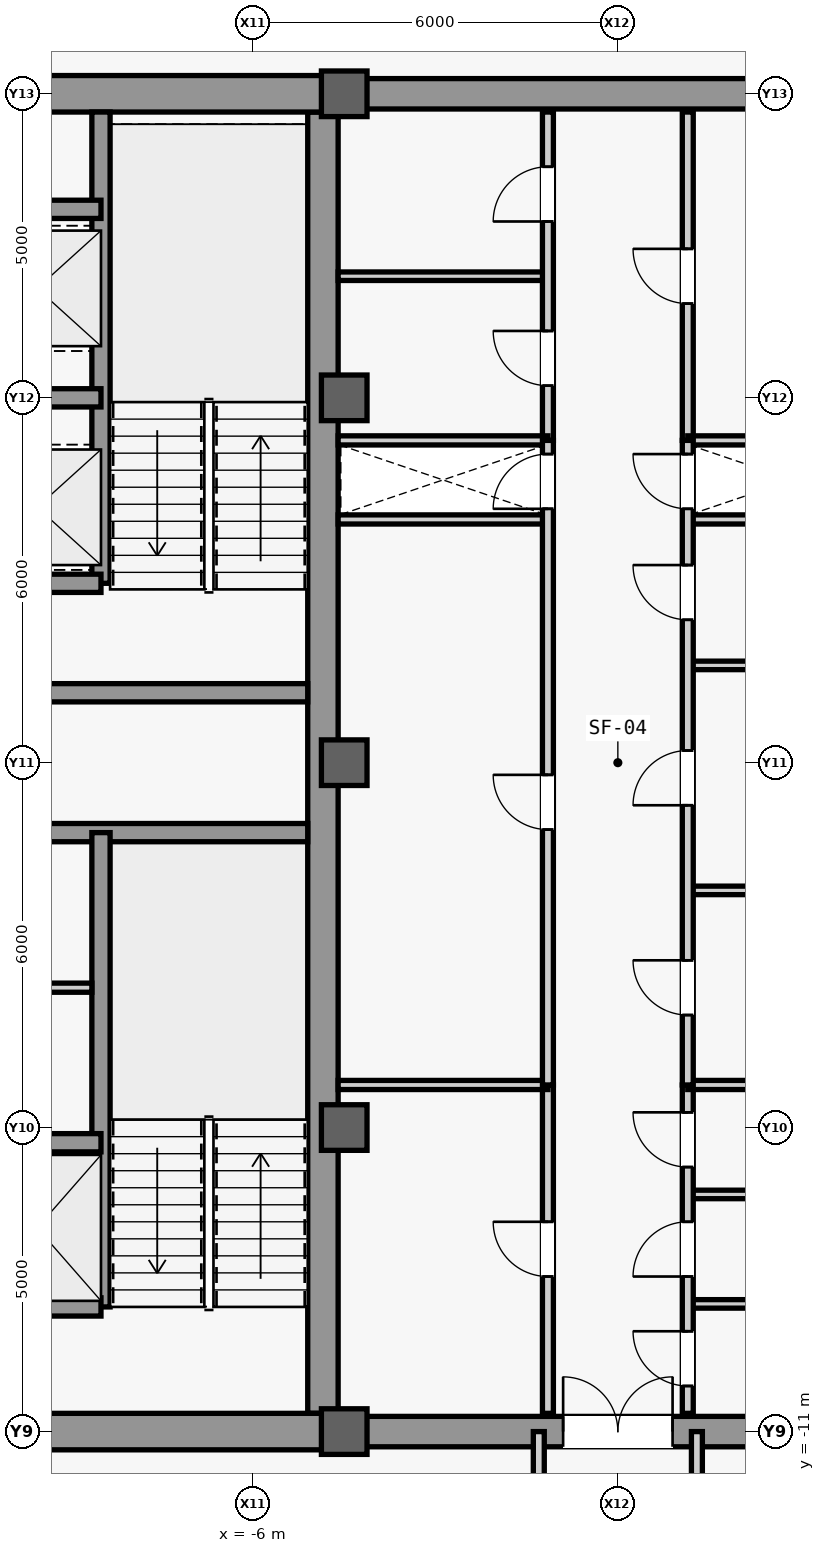
"""IFC4 building model, lengths in metres.
Left out: names, types, materials, properties, quantities, classifications, styles, units other than length and angle.
Written with IfcOpenShell. Run it as: python <this file> out.ifc"""

import sys

from ifc_helpers import new_model, si_unit, direction, frame, frame_2d, origin, origin_2d, place, context, subcontext, project, spatial, rectangle, extrude, source, transform, mapped, element, fill, save


model = new_model("IFC4")
c1 = context("Model", 3, precision=1e-05, world=origin(), true_north=direction((0.0, 1.0)))
c2 = subcontext(c1, "Body", "Model", "MODEL_VIEW")
j1 = project(units=[si_unit("LENGTHUNIT", "METRE"), si_unit("PLANEANGLEUNIT", "RADIAN")], contexts=[c1])
p1 = place(None, origin())
s1 = spatial("IfcSite", under=j1, at=p1, CompositionType="ELEMENT")
p2 = place(p1, origin())
s2 = spatial("IfcBuilding", under=s1, at=p2, CompositionType="ELEMENT")
p3 = place(p2, frame((0.0, 0.0, 313.5)))
s3 = spatial("IfcBuildingStorey", under=s2, at=p3, CompositionType="ELEMENT", Elevation=313.5)
m1 = source(origin(), c2, "Body", "SweptSolid", [
    extrude(rectangle(XDim=21.4, YDim=0.5, at=frame_2d((10.7, 0.0))), origin(), (0.0, 0.0, 1.0), 3.78),
])
p4 = place(p3, frame((-4.85, -10.7, 0.0), z_axis=(0.0, 0.0, 1.0), x_axis=(0.0, 1.0, 0.0)))
e1 = element("IfcWall", 1, at=p4, inside=s3, PredefinedType="SHEAR", context=c2, shape_type="MappedRepresentation", body=[
    mapped(m1, transform((0.0, 0.0, 0.0), scale=1.0)),
])
m2 = source(origin(), c2, "Body", "SweptSolid", [
    extrude(rectangle(XDim=5.9, YDim=0.6, at=frame_2d((2.95, 0.0))), origin(), (0.0, 0.0, 1.0), 3.78),
])
for number, where, z_axis, x_axis in (
    (2, (-10.75, -11.0, 0.0), (0.0, 0.0, 1.0), (1.0, 0.0, 0.0)),
    (3, (-10.75, 11.0, 0.0), (0.0, 0.0, 1.0), (1.0, 0.0, 0.0)),
):
    element("IfcWall", number, at=place(p3, frame(where, z_axis=z_axis, x_axis=x_axis)), inside=s3, PredefinedType="SHEAR", context=c2, shape_type="MappedRepresentation", body=[
        mapped(m2, transform((0.0, 0.0, 0.0), scale=1.0)),
    ])
m3 = source(origin(), c2, "Body", "SweptSolid", [
    extrude(rectangle(XDim=5.65, YDim=0.3, at=frame_2d((2.825, 0.0))), origin(), (0.0, 0.0, 1.0), 3.78),
])
for number, where, z_axis, x_axis in (
    (4, (-10.75, -1.15, 0.0), (0.0, 0.0, 1.0), (1.0, 0.0, 0.0)),
    (5, (-10.75, 1.15, 0.0), (0.0, 0.0, 1.0), (1.0, 0.0, 0.0)),
):
    element("IfcWall", number, at=place(p3, frame(where, z_axis=z_axis, x_axis=x_axis)), inside=s3, PredefinedType="SHEAR", context=c2, shape_type="MappedRepresentation", body=[
        mapped(m3, transform((0.0, 0.0, 0.0), scale=1.0)),
    ])
m4 = source(origin(), c2, "Body", "SweptSolid", [
    extrude(rectangle(XDim=9.2, YDim=0.5, at=frame_2d((4.6, 0.0))), origin(), (0.0, 0.0, 1.0), 3.78),
])
p5 = place(p3, frame((-4.6, -11.0, 0.0), z_axis=(0.0, 0.0, 1.0), x_axis=(1.0, 0.0, 0.0)))
e6 = element("IfcWall", 6, at=p5, inside=s3, PredefinedType="SHEAR", context=c2, shape_type="MappedRepresentation", body=[
    mapped(m4, transform((0.0, 0.0, 0.0), scale=1.0)),
])
m5 = source(origin(), c2, "Body", "SweptSolid", [
    extrude(rectangle(XDim=1.8, YDim=2.25, at=frame_2d((0.9, 1.125))), frame((0.0, 0.26, 0.0), z_axis=(0.0, -1.0, 0.0), x_axis=(1.0, 0.0, 0.0)), (0.0, 0.0, 1.0), 0.52),
])
p6 = place(p5, frame((3.7, 0.0, 0.0)))
e7 = element("IfcOpeningElement", 7, at=p6, cuts=e6, PredefinedType="OPENING", context=c2, shape_type="MappedRepresentation", body=[
    mapped(m5, transform((0.0, 0.0, 0.0), scale=1.0)),
])
p7 = place(p3, frame((-4.6, 11.0, 0.0), z_axis=(0.0, 0.0, 1.0), x_axis=(1.0, 0.0, 0.0)))
e8 = element("IfcWall", 8, at=p7, inside=s3, PredefinedType="SHEAR", context=c2, shape_type="MappedRepresentation", body=[
    mapped(m4, transform((0.0, 0.0, 0.0), scale=1.0)),
])
m6 = source(origin(), c2, "Body", "SweptSolid", [
    extrude(rectangle(XDim=0.75, YDim=0.75, at=origin_2d()), origin(), (0.0, 0.0, 1.0), 4.0),
])
for number, where, z_axis, x_axis in (
    (9, (-4.5, -11.0, 0.0), (0.0, 0.0, 1.0), (1.0, 0.0, 0.0)),
    (10, (-4.5, -6.0, 0.0), (0.0, 0.0, 1.0), (1.0, 0.0, 0.0)),
    (11, (-4.5, 0.0, 0.0), (0.0, 0.0, 1.0), (1.0, 0.0, 0.0)),
    (12, (-4.5, 6.0, 0.0), (0.0, 0.0, 1.0), (1.0, 0.0, 0.0)),
    (13, (-4.5, 11.0, 0.0), (0.0, 0.0, 1.0), (1.0, 0.0, 0.0)),
):
    element("IfcColumn", number, at=place(p3, frame(where, z_axis=z_axis, x_axis=x_axis)), inside=s3, PredefinedType="COLUMN", context=c2, shape_type="MappedRepresentation", body=[
        mapped(m6, transform((0.0, 0.0, 0.0), scale=1.0)),
    ])
m7 = source(origin(), c2, "Body", "SweptSolid", [
    extrude(rectangle(XDim=7.8, YDim=0.3, at=frame_2d((3.9, 0.0))), origin(), (0.0, 0.0, 1.0), 3.78),
])
p8 = place(p3, frame((-8.5, -8.95, 0.0), z_axis=(0.0, 0.0, 1.0), x_axis=(0.0, 1.0, 0.0)))
e14 = element("IfcWall", 14, at=p8, inside=s3, PredefinedType="SHEAR", context=c2, shape_type="MappedRepresentation", body=[
    mapped(m7, transform((0.0, 0.0, 0.0), scale=1.0)),
])
m8 = source(origin(), c2, "Body", "SweptSolid", [
    extrude(rectangle(XDim=2.2, YDim=0.3, at=frame_2d((1.1, 0.0))), origin(), (0.0, 0.0, 1.0), 3.78),
])
for number, where, z_axis, x_axis in (
    (15, (-10.7, -8.95, 0.0), (0.0, 0.0, 1.0), (1.0, 0.0, 0.0)),
    (16, (-10.7, -6.25, 0.0), (0.0, 0.0, 1.0), (1.0, 0.0, 0.0)),
):
    element("IfcWall", number, at=place(p3, frame(where, z_axis=z_axis, x_axis=x_axis)), inside=s3, PredefinedType="SHEAR", context=c2, shape_type="MappedRepresentation", body=[
        mapped(m8, transform((0.0, 0.0, 0.0), scale=1.0)),
    ])
m9 = source(origin(), c2, "Body", "SweptSolid", [
    extrude(rectangle(XDim=7.75, YDim=0.3, at=frame_2d((3.875, 0.0))), origin(), (0.0, 0.0, 1.0), 3.78),
])
p9 = place(p3, frame((-8.5, 2.95, 0.0), z_axis=(0.0, 0.0, 1.0), x_axis=(0.0, 1.0, 0.0)))
e17 = element("IfcWall", 17, at=p9, inside=s3, PredefinedType="SHEAR", context=c2, shape_type="MappedRepresentation", body=[
    mapped(m9, transform((0.0, 0.0, 0.0), scale=1.0)),
])
for number, where, z_axis, x_axis in (
    (18, (-10.7, 2.95, 0.0), (0.0, 0.0, 1.0), (1.0, 0.0, 0.0)),
    (19, (-10.7, 6.0, 0.0), (0.0, 0.0, 1.0), (1.0, 0.0, 0.0)),
    (20, (-10.7, 9.1, 0.0), (0.0, 0.0, 1.0), (1.0, 0.0, 0.0)),
):
    element("IfcWall", number, at=place(p3, frame(where, z_axis=z_axis, x_axis=x_axis)), inside=s3, PredefinedType="SHEAR", context=c2, shape_type="MappedRepresentation", body=[
        mapped(m8, transform((0.0, 0.0, 0.0), scale=1.0)),
    ])
m10 = source(origin(), c2, "Body", "SweptSolid", [
    extrude(rectangle(XDim=2.05, YDim=0.15, at=frame_2d((1.025, 0.0))), origin(), (0.0, 0.0, 1.0), 3.78),
])
p10 = place(p3, frame((-10.7, -3.7, 0.0), z_axis=(0.0, 0.0, 1.0), x_axis=(1.0, 0.0, 0.0)))
e21 = element("IfcWall", 21, at=p10, inside=s3, PredefinedType="PARTITIONING", context=c2, shape_type="MappedRepresentation", body=[
    mapped(m10, transform((0.0, 0.0, 0.0), scale=1.0)),
])
m11 = source(origin(), c2, "Body", "SweptSolid", [
    extrude(rectangle(XDim=3.45, YDim=0.15, at=frame_2d((1.725, 0.0))), origin(), (0.0, 0.0, 1.0), 3.78),
])
for number, where, z_axis, x_axis in (
    (22, (-4.6, 4.0, 0.0), (0.0, 0.0, 1.0), (1.0, 0.0, 0.0)),
    (23, (1.15, 4.0, 0.0), (0.0, 0.0, 1.0), (1.0, 0.0, 0.0)),
):
    element("IfcWall", number, at=place(p3, frame(where, z_axis=z_axis, x_axis=x_axis)), inside=s3, PredefinedType="PARTITIONING", context=c2, shape_type="MappedRepresentation", body=[
        mapped(m11, transform((0.0, 0.0, 0.0), scale=1.0)),
    ])
m12 = source(origin(), c2, "Body", "SweptSolid", [
    extrude(rectangle(XDim=5.4, YDim=0.18, at=frame_2d((2.7, 0.0))), origin(), (0.0, 0.0, 1.0), 3.78),
])
p11 = place(p3, frame((-1.15, -10.7, 0.0), z_axis=(0.0, 0.0, 1.0), x_axis=(0.0, 1.0, 0.0)))
e24 = element("IfcWall", 24, at=p11, inside=s3, PredefinedType="PARTITIONING", context=c2, shape_type="MappedRepresentation", body=[
    mapped(m12, transform((0.0, 0.0, 0.0), scale=1.0)),
])
m13 = source(origin(), c2, "Body", "SweptSolid", [
    extrude(rectangle(XDim=0.9, YDim=2.15, at=frame_2d((0.45, 1.075))), frame((0.0, 0.1, 0.0), z_axis=(0.0, -1.0, 0.0), x_axis=(1.0, 0.0, 0.0)), (0.0, 0.0, 1.0), 0.2),
])
p12 = place(p11, frame((2.25, 0.0, 0.0)))
e25 = element("IfcOpeningElement", 25, at=p12, cuts=e24, PredefinedType="OPENING", context=c2, shape_type="MappedRepresentation", body=[
    mapped(m13, transform((0.0, 0.0, 0.0), scale=1.0)),
])
m14 = source(origin(), c2, "Body", "SweptSolid", [
    extrude(rectangle(XDim=3.45, YDim=0.14, at=frame_2d((1.725, 0.0))), origin(), (0.0, 0.0, 1.0), 3.78),
])
for number, where, z_axis, x_axis in (
    (26, (1.15, -8.9, 0.0), (0.0, 0.0, 1.0), (1.0, 0.0, 0.0)),
    (27, (1.15, -7.1, 0.0), (0.0, 0.0, 1.0), (1.0, 0.0, 0.0)),
):
    element("IfcWall", number, at=place(p3, frame(where, z_axis=z_axis, x_axis=x_axis)), inside=s3, PredefinedType="PARTITIONING", context=c2, shape_type="MappedRepresentation", body=[
        mapped(m14, transform((0.0, 0.0, 0.0), scale=1.0)),
    ])
p13 = place(p3, frame((1.15, -10.7, 0.0), z_axis=(0.0, 0.0, 1.0), x_axis=(0.0, 1.0, 0.0)))
e28 = element("IfcWall", 28, at=p13, inside=s3, PredefinedType="PARTITIONING", context=c2, shape_type="MappedRepresentation", body=[
    mapped(m12, transform((0.0, 0.0, 0.0), scale=1.0)),
])
p14 = place(p13, frame((0.45, 0.0, 0.0)))
e29 = element("IfcOpeningElement", 29, at=p14, cuts=e28, PredefinedType="OPENING", context=c2, shape_type="MappedRepresentation", body=[
    mapped(m13, transform((0.0, 0.0, 0.0), scale=1.0)),
])
p15 = place(p13, frame((2.25, 0.0, 0.0)))
e30 = element("IfcOpeningElement", 30, at=p15, cuts=e28, PredefinedType="OPENING", context=c2, shape_type="MappedRepresentation", body=[
    mapped(m13, transform((0.0, 0.0, 0.0), scale=1.0)),
])
p16 = place(p13, frame((4.05, 0.0, 0.0)))
e31 = element("IfcOpeningElement", 31, at=p16, cuts=e28, PredefinedType="OPENING", context=c2, shape_type="MappedRepresentation", body=[
    mapped(m13, transform((0.0, 0.0, 0.0), scale=1.0)),
])
for number, where, z_axis, x_axis in (
    (32, (-4.6, -5.3, 0.0), (0.0, 0.0, 1.0), (1.0, 0.0, 0.0)),
    (33, (1.15, -5.3, 0.0), (0.0, 0.0, 1.0), (1.0, 0.0, 0.0)),
):
    element("IfcWall", number, at=place(p3, frame(where, z_axis=z_axis, x_axis=x_axis)), inside=s3, PredefinedType="PARTITIONING", context=c2, shape_type="MappedRepresentation", body=[
        mapped(m11, transform((0.0, 0.0, 0.0), scale=1.0)),
    ])
p17 = place(p3, frame((-4.6, 8.0, 0.0), z_axis=(0.0, 0.0, 1.0), x_axis=(1.0, 0.0, 0.0)))
e34 = element("IfcWall", 34, at=p17, inside=s3, PredefinedType="PARTITIONING", context=c2, shape_type="MappedRepresentation", body=[
    mapped(m14, transform((0.0, 0.0, 0.0), scale=1.0)),
])
p18 = place(p3, frame((-1.15, 5.3, 0.0), z_axis=(0.0, 0.0, 1.0), x_axis=(0.0, 1.0, 0.0)))
e35 = element("IfcWall", 35, at=p18, inside=s3, PredefinedType="PARTITIONING", context=c2, shape_type="MappedRepresentation", body=[
    mapped(m12, transform((0.0, 0.0, 0.0), scale=1.0)),
])
p19 = place(p18, frame((0.9, 0.0, 0.0)))
e36 = element("IfcOpeningElement", 36, at=p19, cuts=e35, PredefinedType="OPENING", context=c2, shape_type="MappedRepresentation", body=[
    mapped(m13, transform((0.0, 0.0, 0.0), scale=1.0)),
])
p20 = place(p18, frame((3.6, 0.0, 0.0)))
e37 = element("IfcOpeningElement", 37, at=p20, cuts=e35, PredefinedType="OPENING", context=c2, shape_type="MappedRepresentation", body=[
    mapped(m13, transform((0.0, 0.0, 0.0), scale=1.0)),
])
p21 = place(p3, frame((1.15, 5.3, 0.0), z_axis=(0.0, 0.0, 1.0), x_axis=(0.0, 1.0, 0.0)))
e38 = element("IfcWall", 38, at=p21, inside=s3, PredefinedType="PARTITIONING", context=c2, shape_type="MappedRepresentation", body=[
    mapped(m12, transform((0.0, 0.0, 0.0), scale=1.0)),
])
p22 = place(p21, frame((2.25, 0.0, 0.0)))
e39 = element("IfcOpeningElement", 39, at=p22, cuts=e38, PredefinedType="OPENING", context=c2, shape_type="MappedRepresentation", body=[
    mapped(m13, transform((0.0, 0.0, 0.0), scale=1.0)),
])
for number, where, z_axis, x_axis in (
    (40, (-4.6, 5.3, 0.0), (0.0, 0.0, 1.0), (1.0, 0.0, 0.0)),
    (41, (1.15, 5.3, 0.0), (0.0, 0.0, 1.0), (1.0, 0.0, 0.0)),
):
    element("IfcWall", number, at=place(p3, frame(where, z_axis=z_axis, x_axis=x_axis)), inside=s3, PredefinedType="PARTITIONING", context=c2, shape_type="MappedRepresentation", body=[
        mapped(m11, transform((0.0, 0.0, 0.0), scale=1.0)),
    ])
m15 = source(origin(), c2, "Body", "SweptSolid", [
    extrude(rectangle(XDim=10.6, YDim=0.18, at=frame_2d((5.3, 0.0))), origin(), (0.0, 0.0, 1.0), 3.78),
])
p23 = place(p3, frame((-1.15, -5.3, 0.0), z_axis=(0.0, 0.0, 1.0), x_axis=(0.0, 1.0, 0.0)))
e42 = element("IfcWall", 42, at=p23, inside=s3, PredefinedType="PARTITIONING", context=c2, shape_type="MappedRepresentation", body=[
    mapped(m15, transform((0.0, 0.0, 0.0), scale=1.0)),
])
p24 = place(p23, frame((4.2, 0.0, 0.0)))
e43 = element("IfcOpeningElement", 43, at=p24, cuts=e42, PredefinedType="OPENING", context=c2, shape_type="MappedRepresentation", body=[
    mapped(m13, transform((0.0, 0.0, 0.0), scale=1.0)),
])
p25 = place(p23, frame((9.475, 0.0, 0.0)))
e44 = element("IfcOpeningElement", 44, at=p25, cuts=e42, PredefinedType="OPENING", context=c2, shape_type="MappedRepresentation", body=[
    mapped(m13, transform((0.0, 0.0, 0.0), scale=1.0)),
])
for number, where, z_axis, x_axis in (
    (45, (1.15, -2.1, 0.0), (0.0, 0.0, 1.0), (1.0, 0.0, 0.0)),
    (46, (1.15, 1.6, 0.0), (0.0, 0.0, 1.0), (1.0, 0.0, 0.0)),
):
    element("IfcWall", number, at=place(p3, frame(where, z_axis=z_axis, x_axis=x_axis)), inside=s3, PredefinedType="PARTITIONING", context=c2, shape_type="MappedRepresentation", body=[
        mapped(m14, transform((0.0, 0.0, 0.0), scale=1.0)),
    ])
p26 = place(p3, frame((1.15, -5.3, 0.0), z_axis=(0.0, 0.0, 1.0), x_axis=(0.0, 1.0, 0.0)))
e47 = element("IfcWall", 47, at=p26, inside=s3, PredefinedType="PARTITIONING", context=c2, shape_type="MappedRepresentation", body=[
    mapped(m15, transform((0.0, 0.0, 0.0), scale=1.0)),
])
p27 = place(p26, frame((1.15, 0.0, 0.0)))
e48 = element("IfcOpeningElement", 48, at=p27, cuts=e47, PredefinedType="OPENING", context=c2, shape_type="MappedRepresentation", body=[
    mapped(m13, transform((0.0, 0.0, 0.0), scale=1.0)),
])
p28 = place(p26, frame((4.6, 0.0, 0.0)))
e49 = element("IfcOpeningElement", 49, at=p28, cuts=e47, PredefinedType="OPENING", context=c2, shape_type="MappedRepresentation", body=[
    mapped(m13, transform((0.0, 0.0, 0.0), scale=1.0)),
])
p29 = place(p26, frame((7.65, 0.0, 0.0)))
e50 = element("IfcOpeningElement", 50, at=p29, cuts=e47, PredefinedType="OPENING", context=c2, shape_type="MappedRepresentation", body=[
    mapped(m13, transform((0.0, 0.0, 0.0), scale=1.0)),
])
p30 = place(p26, frame((9.475, 0.0, 0.0)))
e51 = element("IfcOpeningElement", 51, at=p30, cuts=e47, PredefinedType="OPENING", context=c2, shape_type="MappedRepresentation", body=[
    mapped(m13, transform((0.0, 0.0, 0.0), scale=1.0)),
])
m16 = source(origin(), c2, "Body", "SweptSolid", [
    extrude(rectangle(XDim=4.6, YDim=0.18, at=frame_2d((2.3, 0.0))), origin(), (0.0, 0.0, 1.0), 3.78),
])
for number, where, z_axis, x_axis in (
    (52, (-1.3, -15.6, 0.0), (0.0, 0.0, 1.0), (0.0, 1.0, 0.0)),
    (53, (1.3, -15.6, 0.0), (0.0, 0.0, 1.0), (0.0, 1.0, 0.0)),
):
    element("IfcWall", number, at=place(p3, frame(where, z_axis=z_axis, x_axis=x_axis)), inside=s3, PredefinedType="PARTITIONING", context=c2, shape_type="MappedRepresentation", body=[
        mapped(m16, transform((0.0, 0.0, 0.0), scale=1.0)),
    ])
m17 = source(origin(), c2, "Body", "SweptSolid", [
    extrude(rectangle(XDim=0.9, YDim=2.15, at=frame_2d((0.45, 1.075))), frame((0.0, 0.025, 0.0), z_axis=(0.0, -1.0, 0.0), x_axis=(1.0, 0.0, 0.0)), (0.0, 0.0, 1.0), 0.05),
])
p31 = place(p12, origin())
e54 = element("IfcDoor", 54, at=p31, inside=s3, OperationType="SINGLE_SWING_RIGHT", PredefinedType="DOOR", context=c2, shape_type="MappedRepresentation", body=[
    mapped(m17, transform((0.0, 0.0, 0.0), scale=1.0)),
])
fill(e25, e54)
p32 = place(p14, origin())
e55 = element("IfcDoor", 55, at=p32, inside=s3, OperationType="SINGLE_SWING_RIGHT", PredefinedType="DOOR", context=c2, shape_type="MappedRepresentation", body=[
    mapped(m17, transform((0.0, 0.0, 0.0), scale=1.0)),
])
fill(e29, e55)
p33 = place(p15, origin())
e56 = element("IfcDoor", 56, at=p33, inside=s3, OperationType="SINGLE_SWING_LEFT", PredefinedType="DOOR", context=c2, shape_type="MappedRepresentation", body=[
    mapped(m17, transform((0.0, 0.0, 0.0), scale=1.0)),
])
fill(e30, e56)
p34 = place(p16, origin())
e57 = element("IfcDoor", 57, at=p34, inside=s3, OperationType="SINGLE_SWING_RIGHT", PredefinedType="DOOR", context=c2, shape_type="MappedRepresentation", body=[
    mapped(m17, transform((0.0, 0.0, 0.0), scale=1.0)),
])
fill(e31, e57)
m18 = source(origin(), c2, "Body", "SweptSolid", [
    extrude(rectangle(XDim=1.8, YDim=2.25, at=frame_2d((0.9, 1.125))), frame((0.0, 0.025, 0.0), z_axis=(0.0, -1.0, 0.0), x_axis=(1.0, 0.0, 0.0)), (0.0, 0.0, 1.0), 0.05),
])
p35 = place(p6, origin())
e58 = element("IfcDoor", 58, at=p35, inside=s3, OperationType="SINGLE_SWING_LEFT", PredefinedType="DOOR", context=c2, shape_type="MappedRepresentation", body=[
    mapped(m18, transform((0.0, 0.0, 0.0), scale=1.0)),
])
fill(e7, e58)
p36 = place(p19, origin())
e59 = element("IfcDoor", 59, at=p36, inside=s3, OperationType="SINGLE_SWING_RIGHT", PredefinedType="DOOR", context=c2, shape_type="MappedRepresentation", body=[
    mapped(m17, transform((0.0, 0.0, 0.0), scale=1.0)),
])
fill(e36, e59)
p37 = place(p20, origin())
e60 = element("IfcDoor", 60, at=p37, inside=s3, OperationType="SINGLE_SWING_LEFT", PredefinedType="DOOR", context=c2, shape_type="MappedRepresentation", body=[
    mapped(m17, transform((0.0, 0.0, 0.0), scale=1.0)),
])
fill(e37, e60)
p38 = place(p22, origin())
e61 = element("IfcDoor", 61, at=p38, inside=s3, OperationType="SINGLE_SWING_RIGHT", PredefinedType="DOOR", context=c2, shape_type="MappedRepresentation", body=[
    mapped(m17, transform((0.0, 0.0, 0.0), scale=1.0)),
])
fill(e39, e61)
p39 = place(p24, origin())
e62 = element("IfcDoor", 62, at=p39, inside=s3, OperationType="SINGLE_SWING_RIGHT", PredefinedType="DOOR", context=c2, shape_type="MappedRepresentation", body=[
    mapped(m17, transform((0.0, 0.0, 0.0), scale=1.0)),
])
fill(e43, e62)
p40 = place(p27, origin())
e63 = element("IfcDoor", 63, at=p40, inside=s3, OperationType="SINGLE_SWING_RIGHT", PredefinedType="DOOR", context=c2, shape_type="MappedRepresentation", body=[
    mapped(m17, transform((0.0, 0.0, 0.0), scale=1.0)),
])
fill(e48, e63)
p41 = place(p28, origin())
e64 = element("IfcDoor", 64, at=p41, inside=s3, OperationType="SINGLE_SWING_LEFT", PredefinedType="DOOR", context=c2, shape_type="MappedRepresentation", body=[
    mapped(m17, transform((0.0, 0.0, 0.0), scale=1.0)),
])
fill(e49, e64)
p42 = place(p29, origin())
e65 = element("IfcDoor", 65, at=p42, inside=s3, OperationType="SINGLE_SWING_RIGHT", PredefinedType="DOOR", context=c2, shape_type="MappedRepresentation", body=[
    mapped(m17, transform((0.0, 0.0, 0.0), scale=1.0)),
])
fill(e50, e65)
p43 = place(p25, origin())
e66 = element("IfcDoor", 66, at=p43, inside=s3, OperationType="SINGLE_SWING_LEFT", PredefinedType="DOOR", context=c2, shape_type="MappedRepresentation", body=[
    mapped(m17, transform((0.0, 0.0, 0.0), scale=1.0)),
])
fill(e44, e66)
p44 = place(p30, origin())
e67 = element("IfcDoor", 67, at=p44, inside=s3, OperationType="SINGLE_SWING_RIGHT", PredefinedType="DOOR", context=c2, shape_type="MappedRepresentation", body=[
    mapped(m17, transform((0.0, 0.0, 0.0), scale=1.0)),
])
fill(e51, e67)
save(model, sys.argv[1])
